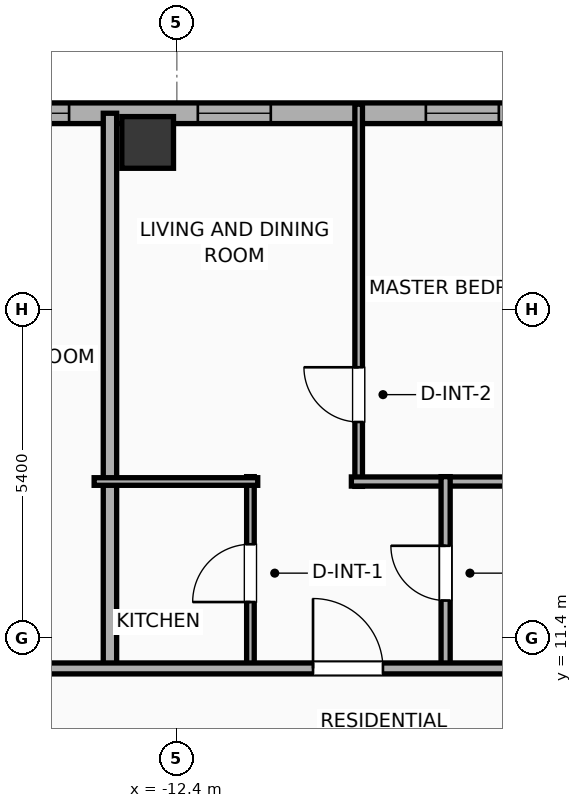
"""IFC4 building model, lengths in metres.
Left out: names, types, materials, properties, quantities, classifications, styles, units other than length and angle.
Written with IfcOpenShell. Run it as: python <this file> out.ifc"""

import sys

from ifc_helpers import new_model, si_unit, direction, frame, frame_2d, origin, origin_2d, place, context, subcontext, project, spatial, rectangle, hollow_rectangle, extrude, element, fill, save


model = new_model("IFC4")
c1 = context("Model", 3, precision=1e-05, world=origin(), true_north=direction((0.0, 1.0)))
c2 = subcontext(c1, "Body", "Model", "MODEL_VIEW")
j1 = project(units=[si_unit("LENGTHUNIT", "METRE"), si_unit("PLANEANGLEUNIT", "RADIAN")], contexts=[c1])
p1 = place(None, origin())
s1 = spatial("IfcSite", under=j1, at=p1, CompositionType="ELEMENT")
p2 = place(p1, origin())
s2 = spatial("IfcBuilding", under=s1, at=p2, CompositionType="ELEMENT")
p3 = place(p2, frame((0.0, 0.0, 243.1)))
s3 = spatial("IfcBuildingStorey", under=s2, at=p3, CompositionType="ELEMENT", Elevation=243.1)
p4 = place(p3, frame((-12.88, 19.55, 0.0), z_axis=(0.0, 0.0, 1.0), x_axis=(1.0, 0.0, 0.0)))
e1 = element("IfcColumn", 1, at=p4, inside=s3, PredefinedType="COLUMN", context=c2, shape_type="SweptSolid", body=[
    extrude(hollow_rectangle(XDim=0.85, YDim=0.85, WallThickness=0.028, at=origin_2d()), origin(), (0.0, 0.0, 1.0), 3.9),
])
p5 = place(p3, frame((-22.783, 20.03, 0.0), z_axis=(0.0, 0.0, 1.0), x_axis=(1.0, 0.0, 0.0)))
e2 = element("IfcWall", 2, at=p5, inside=s3, PredefinedType="ELEMENTEDWALL", context=c2, shape_type="SweptSolid", body=[
    extrude(rectangle(XDim=49.566, YDim=0.34, at=frame_2d((24.783, 0.0))), origin(), (0.0, 0.0, 1.0), 3.65),
])
p6 = place(p5, frame((6.211, 0.0, 0.75)))
e3 = element("IfcOpeningElement", 3, at=p6, cuts=e2, PredefinedType="OPENING", context=c2, shape_type="SweptSolid", body=[
    extrude(rectangle(XDim=2.4, YDim=2.1, at=frame_2d((1.2, 1.05))), frame((0.0, 0.18, 0.0), z_axis=(0.0, -1.0, 0.0), x_axis=(1.0, 0.0, 0.0)), (0.0, 0.0, 1.0), 0.36),
])
p7 = place(p5, frame((25.233, 0.0, 0.75)))
e4 = element("IfcOpeningElement", 4, at=p7, cuts=e2, PredefinedType="OPENING", context=c2, shape_type="SweptSolid", body=[
    extrude(rectangle(XDim=2.4, YDim=2.1, at=frame_2d((1.2, 1.05))), frame((0.0, 0.18, 0.0), z_axis=(0.0, -1.0, 0.0), x_axis=(1.0, 0.0, 0.0)), (0.0, 0.0, 1.0), 0.36),
])
p8 = place(p5, frame((3.511, 0.0, 0.75)))
e5 = element("IfcOpeningElement", 5, at=p8, cuts=e2, PredefinedType="OPENING", context=c2, shape_type="SweptSolid", body=[
    extrude(rectangle(XDim=1.2, YDim=2.05, at=frame_2d((0.6, 1.025))), frame((0.0, 0.18, 0.0), z_axis=(0.0, -1.0, 0.0), x_axis=(1.0, 0.0, 0.0)), (0.0, 0.0, 1.0), 0.36),
])
p9 = place(p5, frame((10.728, 0.0, 0.75)))
e6 = element("IfcOpeningElement", 6, at=p9, cuts=e2, PredefinedType="OPENING", context=c2, shape_type="SweptSolid", body=[
    extrude(rectangle(XDim=1.2, YDim=2.05, at=frame_2d((0.6, 1.025))), frame((0.0, 0.18, 0.0), z_axis=(0.0, -1.0, 0.0), x_axis=(1.0, 0.0, 0.0)), (0.0, 0.0, 1.0), 0.36),
])
p10 = place(p5, frame((14.478, 0.0, 0.75)))
e7 = element("IfcOpeningElement", 7, at=p10, cuts=e2, PredefinedType="OPENING", context=c2, shape_type="SweptSolid", body=[
    extrude(rectangle(XDim=1.2, YDim=2.05, at=frame_2d((0.6, 1.025))), frame((0.0, 0.18, 0.0), z_axis=(0.0, -1.0, 0.0), x_axis=(1.0, 0.0, 0.0)), (0.0, 0.0, 1.0), 0.36),
])
p11 = place(p5, frame((17.988, 0.0, 0.75)))
e8 = element("IfcOpeningElement", 8, at=p11, cuts=e2, PredefinedType="OPENING", context=c2, shape_type="SweptSolid", body=[
    extrude(rectangle(XDim=1.2, YDim=2.05, at=frame_2d((0.6, 1.025))), frame((0.0, 0.18, 0.0), z_axis=(0.0, -1.0, 0.0), x_axis=(1.0, 0.0, 0.0)), (0.0, 0.0, 1.0), 0.36),
])
p12 = place(p5, frame((21.978, 0.0, 0.75)))
e9 = element("IfcOpeningElement", 9, at=p12, cuts=e2, PredefinedType="OPENING", context=c2, shape_type="SweptSolid", body=[
    extrude(rectangle(XDim=1.2, YDim=2.05, at=frame_2d((0.6, 1.025))), frame((0.0, 0.18, 0.0), z_axis=(0.0, -1.0, 0.0), x_axis=(1.0, 0.0, 0.0)), (0.0, 0.0, 1.0), 0.36),
])
p13 = place(p5, frame((30.373, 0.0, 0.75)))
e10 = element("IfcOpeningElement", 10, at=p13, cuts=e2, PredefinedType="OPENING", context=c2, shape_type="SweptSolid", body=[
    extrude(rectangle(XDim=0.85, YDim=2.05, at=frame_2d((0.425, 1.025))), frame((0.0, 0.18, 0.0), z_axis=(0.0, -1.0, 0.0), x_axis=(1.0, 0.0, 0.0)), (0.0, 0.0, 1.0), 0.36),
])
p14 = place(p5, frame((33.228, 0.0, 0.75)))
e11 = element("IfcOpeningElement", 11, at=p14, cuts=e2, PredefinedType="OPENING", context=c2, shape_type="SweptSolid", body=[
    extrude(rectangle(XDim=1.2, YDim=2.05, at=frame_2d((0.6, 1.025))), frame((0.0, 0.18, 0.0), z_axis=(0.0, -1.0, 0.0), x_axis=(1.0, 0.0, 0.0)), (0.0, 0.0, 1.0), 0.36),
])
p15 = place(p5, frame((36.978, 0.0, 0.75)))
e12 = element("IfcOpeningElement", 12, at=p15, cuts=e2, PredefinedType="OPENING", context=c2, shape_type="SweptSolid", body=[
    extrude(rectangle(XDim=1.2, YDim=2.05, at=frame_2d((0.6, 1.025))), frame((0.0, 0.18, 0.0), z_axis=(0.0, -1.0, 0.0), x_axis=(1.0, 0.0, 0.0)), (0.0, 0.0, 1.0), 0.36),
])
p16 = place(p5, frame((40.412, 0.0, 0.75)))
e13 = element("IfcOpeningElement", 13, at=p16, cuts=e2, PredefinedType="OPENING", context=c2, shape_type="SweptSolid", body=[
    extrude(rectangle(XDim=1.2, YDim=2.05, at=frame_2d((0.6, 1.025))), frame((0.0, 0.18, 0.0), z_axis=(0.0, -1.0, 0.0), x_axis=(1.0, 0.0, 0.0)), (0.0, 0.0, 1.0), 0.36),
])
p17 = place(p5, frame((43.846, 0.0, 0.75)))
e14 = element("IfcOpeningElement", 14, at=p17, cuts=e2, PredefinedType="OPENING", context=c2, shape_type="SweptSolid", body=[
    extrude(rectangle(XDim=1.2, YDim=2.05, at=frame_2d((0.6, 1.025))), frame((0.0, 0.18, 0.0), z_axis=(0.0, -1.0, 0.0), x_axis=(1.0, 0.0, 0.0)), (0.0, 0.0, 1.0), 0.36),
])
p18 = place(p5, frame((46.814, 0.0, 0.75)))
e15 = element("IfcOpeningElement", 15, at=p18, cuts=e2, PredefinedType="OPENING", context=c2, shape_type="SweptSolid", body=[
    extrude(rectangle(XDim=1.2, YDim=2.05, at=frame_2d((0.6, 1.025))), frame((0.0, 0.18, 0.0), z_axis=(0.0, -1.0, 0.0), x_axis=(1.0, 0.0, 0.0)), (0.0, 0.0, 1.0), 0.36),
])
p19 = place(p3, frame((-13.5, 10.82, 0.0), z_axis=(0.0, 0.0, 1.0), x_axis=(0.0, 1.0, 0.0)))
e16 = element("IfcWall", 16, at=p19, inside=s3, PredefinedType="PARTITIONING", context=c2, shape_type="SweptSolid", body=[
    extrude(rectangle(XDim=9.21, YDim=0.22, at=frame_2d((4.605, 0.0))), origin(), (0.0, 0.0, 1.0), 3.65),
])
p20 = place(p3, frame((-9.41, 13.894, 0.0), z_axis=(0.0, 0.0, 1.0), x_axis=(0.0, 1.0, 0.0)))
e17 = element("IfcWall", 17, at=p20, inside=s3, PredefinedType="PARTITIONING", context=c2, shape_type="SweptSolid", body=[
    extrude(rectangle(XDim=6.286, YDim=0.125, at=frame_2d((3.143, 0.0))), origin(), (0.0, 0.0, 1.0), 3.65),
])
p21 = place(p20, frame((1.059, 0.0, 0.0)))
e18 = element("IfcOpeningElement", 18, at=p21, cuts=e17, PredefinedType="OPENING", context=c2, shape_type="SweptSolid", body=[
    extrude(rectangle(XDim=0.9, YDim=2.05, at=frame_2d((0.45, 1.025))), frame((0.0, 0.073, 0.0), z_axis=(0.0, -1.0, 0.0), x_axis=(1.0, 0.0, 0.0)), (0.0, 0.0, 1.0), 0.145),
])
p22 = place(p3, frame((-9.53, 13.974, 0.0), z_axis=(0.0, 0.0, 1.0), x_axis=(1.0, 0.0, 0.0)))
e19 = element("IfcWall", 19, at=p22, inside=s3, PredefinedType="PLUMBINGWALL", context=c2, shape_type="SweptSolid", body=[
    extrude(rectangle(XDim=3.79, YDim=0.15, at=frame_2d((1.895, 0.0))), origin(), (0.0, 0.0, 1.0), 3.65),
])
p23 = place(p3, frame((-11.19, 10.88, 0.0), z_axis=(0.0, 0.0, 1.0), x_axis=(0.0, 1.0, 0.0)))
e20 = element("IfcWall", 20, at=p23, inside=s3, PredefinedType="PARTITIONING", context=c2, shape_type="SweptSolid", body=[
    extrude(rectangle(XDim=3.174, YDim=0.125, at=frame_2d((1.587, 0.0))), origin(), (0.0, 0.0, 1.0), 3.65),
])
p24 = place(p23, frame((1.112, 0.0, 0.0)))
e21 = element("IfcOpeningElement", 21, at=p24, cuts=e20, PredefinedType="OPENING", context=c2, shape_type="SweptSolid", body=[
    extrude(rectangle(XDim=0.95, YDim=2.05, at=frame_2d((0.475, 1.025))), frame((0.0, 0.073, 0.0), z_axis=(0.0, -1.0, 0.0), x_axis=(1.0, 0.0, 0.0)), (0.0, 0.0, 1.0), 0.145),
])
p25 = place(p3, frame((-13.76, 13.974, 0.0), z_axis=(0.0, 0.0, 1.0), x_axis=(1.0, 0.0, 0.0)))
e22 = element("IfcWall", 22, at=p25, inside=s3, PredefinedType="PARTITIONING", context=c2, shape_type="SweptSolid", body=[
    extrude(rectangle(XDim=2.69, YDim=0.125, at=frame_2d((1.345, 0.0))), origin(), (0.0, 0.0, 1.0), 3.65),
])
p26 = place(p3, frame((-7.98, 10.88, 0.0), z_axis=(0.0, 0.0, 1.0), x_axis=(0.0, 1.0, 0.0)))
e23 = element("IfcWall", 23, at=p26, inside=s3, PredefinedType="PLUMBINGWALL", context=c2, shape_type="SweptSolid", body=[
    extrude(rectangle(XDim=3.174, YDim=0.15, at=frame_2d((1.587, 0.0))), origin(), (0.0, 0.0, 1.0), 3.65),
])
p27 = place(p26, frame((1.137, 0.0, 0.0)))
e24 = element("IfcOpeningElement", 24, at=p27, cuts=e23, PredefinedType="OPENING", context=c2, shape_type="SweptSolid", body=[
    extrude(rectangle(XDim=0.9, YDim=2.05, at=frame_2d((0.45, 1.025))), frame((0.0, 0.085, 0.0), z_axis=(0.0, -1.0, 0.0), x_axis=(1.0, 0.0, 0.0)), (0.0, 0.0, 1.0), 0.17),
])
p28 = place(p3, frame((-26.23, 10.9, 0.0), z_axis=(0.0, 0.0, 1.0), x_axis=(1.0, 0.0, 0.0)))
e25 = element("IfcWall", 25, at=p28, inside=s3, PredefinedType="PARTITIONING", context=c2, shape_type="SweptSolid", body=[
    extrude(rectangle(XDim=56.46, YDim=0.18, at=frame_2d((28.23, 0.0))), origin(), (0.0, 0.0, 1.0), 3.65),
])
p29 = place(p28, frame((2.825, 0.0, 0.0)))
e26 = element("IfcOpeningElement", 26, at=p29, cuts=e25, PredefinedType="OPENING", context=c2, shape_type="SweptSolid", body=[
    extrude(rectangle(XDim=0.9, YDim=2.05, at=frame_2d((0.45, 1.025))), frame((0.0, 0.1, 0.0), z_axis=(0.0, -1.0, 0.0), x_axis=(1.0, 0.0, 0.0)), (0.0, 0.0, 1.0), 0.2),
])
p30 = place(p28, frame((10.135, 0.0, 0.0)))
e27 = element("IfcOpeningElement", 27, at=p30, cuts=e25, PredefinedType="OPENING", context=c2, shape_type="SweptSolid", body=[
    extrude(rectangle(XDim=1.15, YDim=2.05, at=frame_2d((0.575, 1.025))), frame((0.0, 0.1, 0.0), z_axis=(0.0, -1.0, 0.0), x_axis=(1.0, 0.0, 0.0)), (0.0, 0.0, 1.0), 0.2),
])
p31 = place(p28, frame((16.069, 0.0, 0.0)))
e28 = element("IfcOpeningElement", 28, at=p31, cuts=e25, PredefinedType="OPENING", context=c2, shape_type="SweptSolid", body=[
    extrude(rectangle(XDim=1.15, YDim=2.05, at=frame_2d((0.575, 1.025))), frame((0.0, 0.1, 0.0), z_axis=(0.0, -1.0, 0.0), x_axis=(1.0, 0.0, 0.0)), (0.0, 0.0, 1.0), 0.2),
])
p32 = place(p28, frame((23.567, 0.0, 0.0)))
e29 = element("IfcOpeningElement", 29, at=p32, cuts=e25, PredefinedType="OPENING", context=c2, shape_type="SweptSolid", body=[
    extrude(rectangle(XDim=1.15, YDim=2.05, at=frame_2d((0.575, 1.025))), frame((0.0, 0.1, 0.0), z_axis=(0.0, -1.0, 0.0), x_axis=(1.0, 0.0, 0.0)), (0.0, 0.0, 1.0), 0.2),
])
p33 = place(p28, frame((31.071, 0.0, 0.0)))
e30 = element("IfcOpeningElement", 30, at=p33, cuts=e25, PredefinedType="OPENING", context=c2, shape_type="SweptSolid", body=[
    extrude(rectangle(XDim=1.15, YDim=2.05, at=frame_2d((0.575, 1.025))), frame((0.0, 0.1, 0.0), z_axis=(0.0, -1.0, 0.0), x_axis=(1.0, 0.0, 0.0)), (0.0, 0.0, 1.0), 0.2),
])
p34 = place(p28, frame((38.569, 0.0, 0.0)))
e31 = element("IfcOpeningElement", 31, at=p34, cuts=e25, PredefinedType="OPENING", context=c2, shape_type="SweptSolid", body=[
    extrude(rectangle(XDim=1.15, YDim=2.05, at=frame_2d((0.575, 1.025))), frame((0.0, 0.1, 0.0), z_axis=(0.0, -1.0, 0.0), x_axis=(1.0, 0.0, 0.0)), (0.0, 0.0, 1.0), 0.2),
])
p35 = place(p28, frame((45.881, 0.0, 0.0)))
e32 = element("IfcOpeningElement", 32, at=p35, cuts=e25, PredefinedType="OPENING", context=c2, shape_type="SweptSolid", body=[
    extrude(rectangle(XDim=0.9, YDim=2.05, at=frame_2d((0.45, 1.025))), frame((0.0, 0.1, 0.0), z_axis=(0.0, -1.0, 0.0), x_axis=(1.0, 0.0, 0.0)), (0.0, 0.0, 1.0), 0.2),
])
p36 = place(p28, frame((52.775, 0.0, 0.0)))
e33 = element("IfcOpeningElement", 33, at=p36, cuts=e25, PredefinedType="OPENING", context=c2, shape_type="SweptSolid", body=[
    extrude(rectangle(XDim=0.9, YDim=2.05, at=frame_2d((0.45, 1.025))), frame((0.0, 0.1, 0.0), z_axis=(0.0, -1.0, 0.0), x_axis=(1.0, 0.0, 0.0)), (0.0, 0.0, 1.0), 0.2),
])
p37 = place(p6, origin())
e34 = element("IfcWindow", 34, at=p37, inside=s3, PartitioningType="SINGLE_PANEL", PredefinedType="WINDOW", context=c2, shape_type="SweptSolid", body=[
    extrude(rectangle(XDim=2.4, YDim=2.1, at=frame_2d((1.2, 1.05))), frame((0.0, 0.03, 0.0), z_axis=(0.0, -1.0, 0.0), x_axis=(1.0, 0.0, 0.0)), (0.0, 0.0, 1.0), 0.06),
])
fill(e3, e34)
p38 = place(p9, origin())
e35 = element("IfcWindow", 35, at=p38, inside=s3, PartitioningType="SINGLE_PANEL", PredefinedType="WINDOW", context=c2, shape_type="SweptSolid", body=[
    extrude(rectangle(XDim=1.2, YDim=2.05, at=frame_2d((0.6, 1.025))), frame((0.0, 0.03, 0.0), z_axis=(0.0, -1.0, 0.0), x_axis=(1.0, 0.0, 0.0)), (0.0, 0.0, 1.0), 0.06),
])
fill(e6, e35)
p39 = place(p10, origin())
e36 = element("IfcWindow", 36, at=p39, inside=s3, PartitioningType="SINGLE_PANEL", PredefinedType="WINDOW", context=c2, shape_type="SweptSolid", body=[
    extrude(rectangle(XDim=1.2, YDim=2.05, at=frame_2d((0.6, 1.025))), frame((0.0, 0.03, 0.0), z_axis=(0.0, -1.0, 0.0), x_axis=(1.0, 0.0, 0.0)), (0.0, 0.0, 1.0), 0.06),
])
fill(e7, e36)
p40 = place(p21, origin())
e37 = element("IfcDoor", 37, at=p40, inside=s3, OperationType="SINGLE_SWING_RIGHT", PredefinedType="DOOR", context=c2, shape_type="SweptSolid", body=[
    extrude(rectangle(XDim=0.9, YDim=2.05, at=frame_2d((0.45, 1.025))), frame((0.0, 0.025, 0.0), z_axis=(0.0, -1.0, 0.0), x_axis=(1.0, 0.0, 0.0)), (0.0, 0.0, 1.0), 0.05),
])
fill(e18, e37)
p41 = place(p24, origin())
e38 = element("IfcDoor", 38, at=p41, inside=s3, OperationType="SINGLE_SWING_LEFT", PredefinedType="DOOR", context=c2, shape_type="SweptSolid", body=[
    extrude(rectangle(XDim=0.95, YDim=2.05, at=frame_2d((0.475, 1.025))), frame((0.0, 0.025, 0.0), z_axis=(0.0, -1.0, 0.0), x_axis=(1.0, 0.0, 0.0)), (0.0, 0.0, 1.0), 0.05),
])
fill(e21, e38)
p42 = place(p27, origin())
e39 = element("IfcDoor", 39, at=p42, inside=s3, OperationType="SINGLE_SWING_RIGHT", PredefinedType="DOOR", context=c2, shape_type="SweptSolid", body=[
    extrude(rectangle(XDim=0.9, YDim=2.05, at=frame_2d((0.45, 1.025))), frame((0.0, 0.025, 0.0), z_axis=(0.0, -1.0, 0.0), x_axis=(1.0, 0.0, 0.0)), (0.0, 0.0, 1.0), 0.05),
])
fill(e24, e39)
p43 = place(p31, origin())
e40 = element("IfcDoor", 40, at=p43, inside=s3, OperationType="SINGLE_SWING_LEFT", PredefinedType="DOOR", context=c2, shape_type="SweptSolid", body=[
    extrude(rectangle(XDim=1.15, YDim=2.05, at=frame_2d((0.575, 1.025))), frame((0.0, 0.025, 0.0), z_axis=(0.0, -1.0, 0.0), x_axis=(1.0, 0.0, 0.0)), (0.0, 0.0, 1.0), 0.05),
])
fill(e28, e40)
save(model, sys.argv[1])
